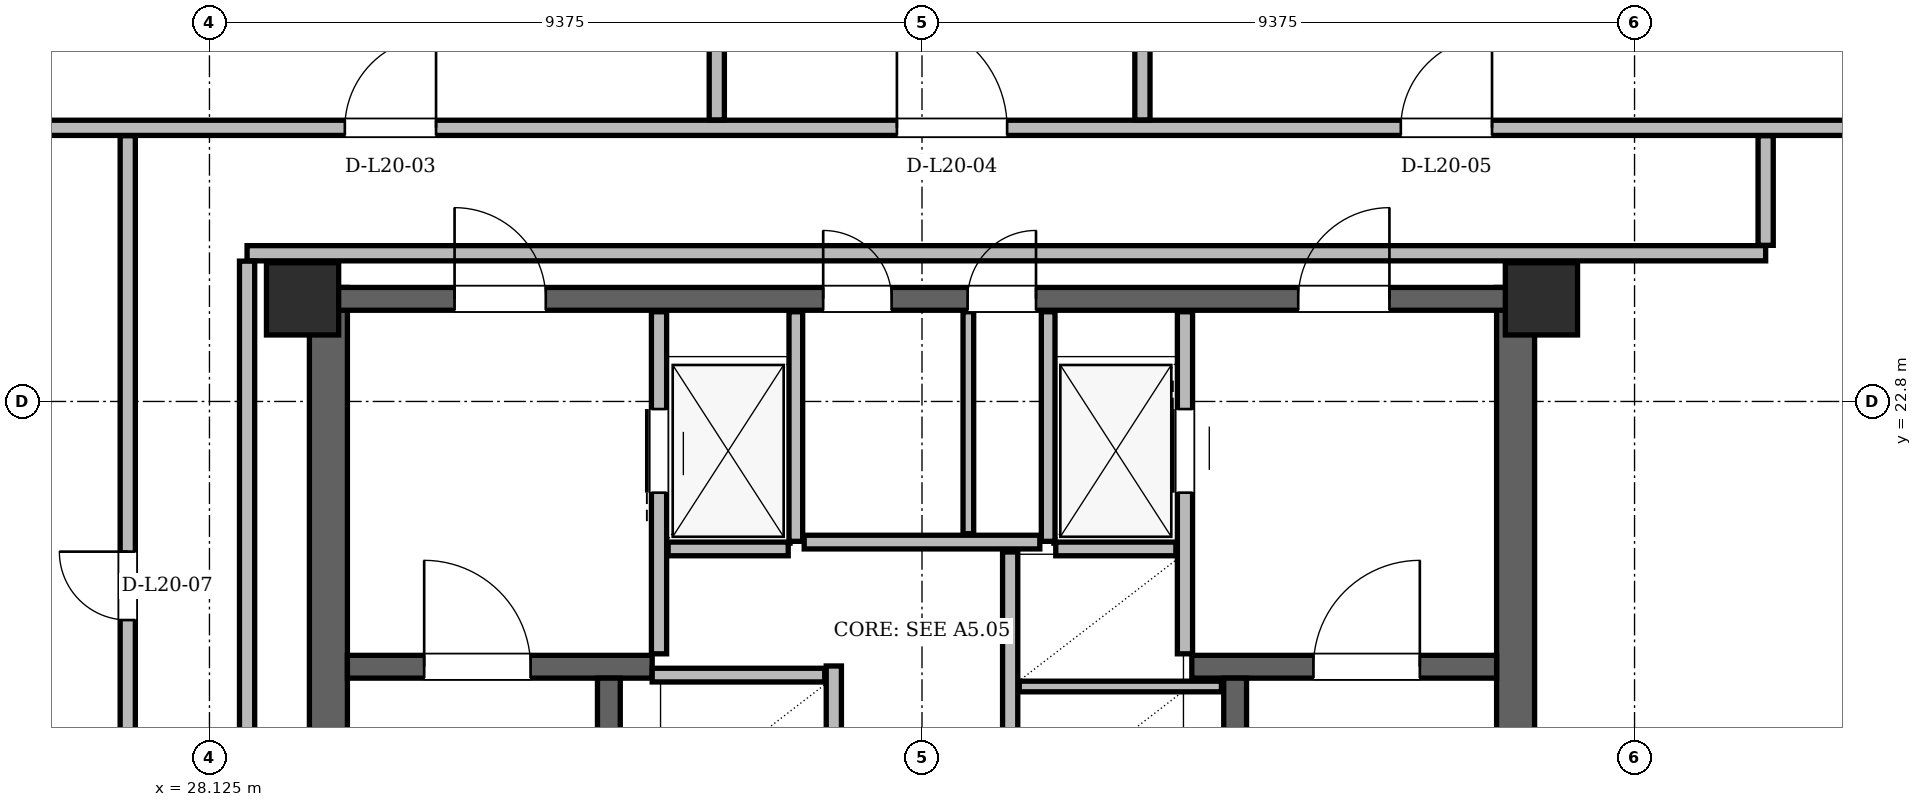
"""IFC4 building model, lengths in metres.
Left out: names, types, materials, properties, quantities, classifications, styles, units other than length and angle.
Written with IfcOpenShell. Run it as: python <this file> out.ifc"""

import sys

from ifc_helpers import new_model, si_unit, direction, frame, frame_2d, origin, origin_2d, place, context, subcontext, project, spatial, rectangle, hollow_rectangle, extrude, element, fill, save


model = new_model("IFC4")
c1 = context("Model", 3, precision=1e-05, world=origin(), true_north=direction((0.0, 1.0)))
c2 = subcontext(c1, "Body", "Model", "MODEL_VIEW")
j1 = project(units=[si_unit("LENGTHUNIT", "METRE"), si_unit("PLANEANGLEUNIT", "RADIAN")], contexts=[c1])
p1 = place(None, origin())
s1 = spatial("IfcSite", under=j1, at=p1, CompositionType="ELEMENT")
p2 = place(p1, origin())
s2 = spatial("IfcBuilding", under=s1, at=p2, CompositionType="ELEMENT")
p3 = place(p2, frame((0.0, 0.0, 77.7)))
s3 = spatial("IfcBuildingStorey", under=s2, at=p3, CompositionType="ELEMENT", Elevation=77.7)
for number, where, z_axis, x_axis in (
    (1, (45.65, 24.15, 0.0), (0.0, 0.0, 1.0), (1.0, 0.0, 0.0)),
    (2, (29.35, 24.15, 0.0), (0.0, 0.0, 1.0), (1.0, 0.0, 0.0)),
):
    element("IfcColumn", number, at=place(p3, frame(where, z_axis=z_axis, x_axis=x_axis)), inside=s3, PredefinedType="COLUMN", context=c2, shape_type="SweptSolid", body=[
        extrude(hollow_rectangle(XDim=0.95, YDim=0.95, WallThickness=0.08, at=origin_2d()), origin(), (0.0, 0.0, 1.0), 4.8),
    ])
for number, where, z_axis, x_axis in (
    (3, (29.69, 11.0, 0.0), (0.0, 0.0, 1.0), (0.0, 1.0, 0.0)),
    (4, (45.31, 11.0, 0.0), (0.0, 0.0, 1.0), (0.0, 1.0, 0.0)),
):
    element("IfcWall", number, at=place(p3, frame(where, z_axis=z_axis, x_axis=x_axis)), inside=s3, PredefinedType="SHEAR", context=c2, shape_type="SweptSolid", body=[
        extrude(rectangle(XDim=13.3, YDim=0.5, at=frame_2d((6.65, 0.0))), origin(), (0.0, 0.0, 1.0), 4.56),
    ])
p4 = place(p3, frame((29.65, 24.15, 0.0), z_axis=(0.0, 0.0, 1.0), x_axis=(1.0, 0.0, 0.0)))
e5 = element("IfcWall", 5, at=p4, inside=s3, PredefinedType="SHEAR", context=c2, shape_type="SweptSolid", body=[
    extrude(rectangle(XDim=15.7, YDim=0.3, at=frame_2d((7.85, 0.0))), origin(), (0.0, 0.0, 1.0), 4.56),
])
p5 = place(p4, frame((1.7, 0.0, 0.0)))
e6 = element("IfcOpeningElement", 6, at=p5, cuts=e5, PredefinedType="OPENING", context=c2, shape_type="SweptSolid", body=[
    extrude(rectangle(XDim=1.2, YDim=2.2, at=frame_2d((0.6, 1.1))), frame((0.0, 0.15, 0.0), z_axis=(0.0, -1.0, 0.0), x_axis=(1.0, 0.0, 0.0)), (0.0, 0.0, 1.0), 0.3),
])
p6 = place(p4, frame((12.8, 0.0, 0.0)))
e7 = element("IfcOpeningElement", 7, at=p6, cuts=e5, PredefinedType="OPENING", context=c2, shape_type="SweptSolid", body=[
    extrude(rectangle(XDim=1.2, YDim=2.2, at=frame_2d((0.6, 1.1))), frame((0.0, 0.15, 0.0), z_axis=(0.0, -1.0, 0.0), x_axis=(1.0, 0.0, 0.0)), (0.0, 0.0, 1.0), 0.3),
])
p7 = place(p4, frame((6.55, 0.0, 0.0)))
e8 = element("IfcOpeningElement", 8, at=p7, cuts=e5, PredefinedType="OPENING", context=c2, shape_type="SweptSolid", body=[
    extrude(rectangle(XDim=0.9, YDim=2.05, at=frame_2d((0.45, 1.025))), frame((0.0, 0.15, 0.0), z_axis=(0.0, -1.0, 0.0), x_axis=(1.0, 0.0, 0.0)), (0.0, 0.0, 1.0), 0.3),
])
p8 = place(p4, frame((8.45, 0.0, 0.0)))
e9 = element("IfcOpeningElement", 9, at=p8, cuts=e5, PredefinedType="OPENING", context=c2, shape_type="SweptSolid", body=[
    extrude(rectangle(XDim=0.9, YDim=2.05, at=frame_2d((0.45, 1.025))), frame((0.0, 0.15, 0.0), z_axis=(0.0, -1.0, 0.0), x_axis=(1.0, 0.0, 0.0)), (0.0, 0.0, 1.0), 0.3),
])
p9 = place(p3, frame((29.94, 19.31, 0.0), z_axis=(0.0, 0.0, 1.0), x_axis=(1.0, 0.0, 0.0)))
e10 = element("IfcWall", 10, at=p9, inside=s3, PredefinedType="SHEAR", context=c2, shape_type="SweptSolid", body=[
    extrude(rectangle(XDim=4.01, YDim=0.3, at=frame_2d((2.005, 0.0))), origin(), (0.0, 0.0, 1.0), 4.56),
])
p10 = place(p9, frame((1.01, 0.0, 0.0)))
e11 = element("IfcOpeningElement", 11, at=p10, cuts=e10, PredefinedType="OPENING", context=c2, shape_type="SweptSolid", body=[
    extrude(rectangle(XDim=1.4, YDim=2.2, at=frame_2d((0.7, 1.1))), frame((0.0, 0.15, 0.0), z_axis=(0.0, -1.0, 0.0), x_axis=(1.0, 0.0, 0.0)), (0.0, 0.0, 1.0), 0.3),
])
p11 = place(p3, frame((41.05, 19.31, 0.0), z_axis=(0.0, 0.0, 1.0), x_axis=(1.0, 0.0, 0.0)))
e12 = element("IfcWall", 12, at=p11, inside=s3, PredefinedType="SHEAR", context=c2, shape_type="SweptSolid", body=[
    extrude(rectangle(XDim=4.01, YDim=0.3, at=frame_2d((2.005, 0.0))), origin(), (0.0, 0.0, 1.0), 4.56),
])
p12 = place(p11, frame((1.6, 0.0, 0.0)))
e13 = element("IfcOpeningElement", 13, at=p12, cuts=e12, PredefinedType="OPENING", context=c2, shape_type="SweptSolid", body=[
    extrude(rectangle(XDim=1.4, YDim=2.2, at=frame_2d((0.7, 1.1))), frame((0.0, 0.15, 0.0), z_axis=(0.0, -1.0, 0.0), x_axis=(1.0, 0.0, 0.0)), (0.0, 0.0, 1.0), 0.3),
])
for number, where, z_axis, x_axis in (
    (14, (33.38, 11.54, 0.0), (0.0, 0.0, 1.0), (0.0, 1.0, 0.0)),
    (15, (41.62, 11.54, 0.0), (0.0, 0.0, 1.0), (0.0, 1.0, 0.0)),
):
    element("IfcWall", number, at=place(p3, frame(where, z_axis=z_axis, x_axis=x_axis)), inside=s3, PredefinedType="SHEAR", context=c2, shape_type="SweptSolid", body=[
        extrude(rectangle(XDim=7.62, YDim=0.3, at=frame_2d((3.81, 0.0))), origin(), (0.0, 0.0, 1.0), 4.56),
    ])
for number, where, z_axis, x_axis in (
    (16, (61.034, 14.044, 0.0), (0.0, 0.0, 1.0), (-0.5, 0.866, 0.0)),
    (17, (30.978, 43.509, 0.0), (0.0, 0.0, 1.0), (-0.5, -0.866, 0.0)),
):
    element("IfcWall", number, at=place(p3, frame(where, z_axis=z_axis, x_axis=x_axis)), inside=s3, PredefinedType="SOLIDWALL", context=c2, shape_type="SweptSolid", body=[
        extrude(rectangle(XDim=34.024, YDim=0.34, at=frame_2d((17.012, 0.0))), origin(), (0.0, 0.0, 1.0), 3.55),
    ])
p13 = place(p3, frame((34.04, 19.48, 0.0), z_axis=(0.0, 0.0, 1.0), x_axis=(0.0, 1.0, 0.0)))
e18 = element("IfcWall", 18, at=p13, inside=s3, PredefinedType="PARTITIONING", context=c2, shape_type="SweptSolid", body=[
    extrude(rectangle(XDim=4.5, YDim=0.2, at=frame_2d((2.25, 0.0))), origin(), (0.0, 0.0, 1.0), 3.6),
])
p14 = place(p13, frame((2.12, 0.0, 0.0)))
e19 = element("IfcOpeningElement", 19, at=p14, cuts=e18, PredefinedType="OPENING", context=c2, shape_type="SweptSolid", body=[
    extrude(rectangle(XDim=1.1, YDim=2.2, at=frame_2d((0.55, 1.1))), frame((0.0, 0.1, 0.0), z_axis=(0.0, -1.0, 0.0), x_axis=(1.0, 0.0, 0.0)), (0.0, 0.0, 1.0), 0.2),
])
p15 = place(p3, frame((35.84, 20.96, 0.0), z_axis=(0.0, 0.0, 1.0), x_axis=(0.0, 1.0, 0.0)))
e20 = element("IfcWall", 20, at=p15, inside=s3, PredefinedType="PARTITIONING", context=c2, shape_type="SweptSolid", body=[
    extrude(rectangle(XDim=3.02, YDim=0.18, at=frame_2d((1.51, 0.0))), origin(), (0.0, 0.0, 1.0), 3.6),
])
p16 = place(p3, frame((34.16, 20.86, 0.0), z_axis=(0.0, 0.0, 1.0), x_axis=(1.0, 0.0, 0.0)))
e21 = element("IfcWall", 21, at=p16, inside=s3, PredefinedType="PARTITIONING", context=c2, shape_type="SweptSolid", body=[
    extrude(rectangle(XDim=1.58, YDim=0.18, at=frame_2d((0.79, 0.0))), origin(), (0.0, 0.0, 1.0), 4.56),
])
p17 = place(p3, frame((40.96, 19.48, 0.0), z_axis=(0.0, 0.0, 1.0), x_axis=(0.0, 1.0, 0.0)))
e22 = element("IfcWall", 22, at=p17, inside=s3, PredefinedType="PARTITIONING", context=c2, shape_type="SweptSolid", body=[
    extrude(rectangle(XDim=4.5, YDim=0.2, at=frame_2d((2.25, 0.0))), origin(), (0.0, 0.0, 1.0), 3.6),
])
p18 = place(p17, frame((2.12, 0.0, 0.0)))
e23 = element("IfcOpeningElement", 23, at=p18, cuts=e22, PredefinedType="OPENING", context=c2, shape_type="SweptSolid", body=[
    extrude(rectangle(XDim=1.1, YDim=2.2, at=frame_2d((0.55, 1.1))), frame((0.0, 0.1, 0.0), z_axis=(0.0, -1.0, 0.0), x_axis=(1.0, 0.0, 0.0)), (0.0, 0.0, 1.0), 0.2),
])
p19 = place(p3, frame((39.16, 20.96, 0.0), z_axis=(0.0, 0.0, 1.0), x_axis=(0.0, 1.0, 0.0)))
e24 = element("IfcWall", 24, at=p19, inside=s3, PredefinedType="PARTITIONING", context=c2, shape_type="SweptSolid", body=[
    extrude(rectangle(XDim=3.02, YDim=0.18, at=frame_2d((1.51, 0.0))), origin(), (0.0, 0.0, 1.0), 3.6),
])
p20 = place(p3, frame((39.26, 20.86, 0.0), z_axis=(0.0, 0.0, 1.0), x_axis=(1.0, 0.0, 0.0)))
e25 = element("IfcWall", 25, at=p20, inside=s3, PredefinedType="PARTITIONING", context=c2, shape_type="SweptSolid", body=[
    extrude(rectangle(XDim=1.58, YDim=0.18, at=frame_2d((0.79, 0.0))), origin(), (0.0, 0.0, 1.0), 4.56),
])
p21 = place(p3, frame((36.34, 11.72, 0.0), z_axis=(0.0, 0.0, 1.0), x_axis=(0.0, 1.0, 0.0)))
e26 = element("IfcWall", 26, at=p21, inside=s3, PredefinedType="PARTITIONING", context=c2, shape_type="SweptSolid", body=[
    extrude(rectangle(XDim=7.6, YDim=0.2, at=frame_2d((3.8, 0.0))), origin(), (0.0, 0.0, 1.0), 4.56),
])
p22 = place(p21, frame((0.255, 0.0, 0.0)))
e27 = element("IfcOpeningElement", 27, at=p22, cuts=e26, PredefinedType="OPENING", context=c2, shape_type="SweptSolid", body=[
    extrude(rectangle(XDim=1.05, YDim=2.15, at=frame_2d((0.525, 1.075))), frame((0.0, 0.1, 0.0), z_axis=(0.0, -1.0, 0.0), x_axis=(1.0, 0.0, 0.0)), (0.0, 0.0, 1.0), 0.2),
])
p23 = place(p21, frame((2.105, 0.0, 0.0)))
e28 = element("IfcOpeningElement", 28, at=p23, cuts=e26, PredefinedType="OPENING", context=c2, shape_type="SweptSolid", body=[
    extrude(rectangle(XDim=1.05, YDim=2.15, at=frame_2d((0.525, 1.075))), frame((0.0, 0.1, 0.0), z_axis=(0.0, -1.0, 0.0), x_axis=(1.0, 0.0, 0.0)), (0.0, 0.0, 1.0), 0.2),
])
p24 = place(p21, frame((3.955, 0.0, 0.0)))
e29 = element("IfcOpeningElement", 29, at=p24, cuts=e26, PredefinedType="OPENING", context=c2, shape_type="SweptSolid", body=[
    extrude(rectangle(XDim=1.05, YDim=2.15, at=frame_2d((0.525, 1.075))), frame((0.0, 0.1, 0.0), z_axis=(0.0, -1.0, 0.0), x_axis=(1.0, 0.0, 0.0)), (0.0, 0.0, 1.0), 0.2),
])
p25 = place(p3, frame((33.95, 19.2, 0.0), z_axis=(0.0, 0.0, 1.0), x_axis=(1.0, 0.0, 0.0)))
e30 = element("IfcWall", 30, at=p25, inside=s3, PredefinedType="PARTITIONING", context=c2, shape_type="SweptSolid", body=[
    extrude(rectangle(XDim=2.27, YDim=0.18, at=frame_2d((1.135, 0.0))), origin(), (0.0, 0.0, 1.0), 4.56),
])
p26 = place(p3, frame((38.66, 11.72, 0.0), z_axis=(0.0, 0.0, 1.0), x_axis=(0.0, 1.0, 0.0)))
e31 = element("IfcWall", 31, at=p26, inside=s3, PredefinedType="PARTITIONING", context=c2, shape_type="SweptSolid", body=[
    extrude(rectangle(XDim=9.1, YDim=0.2, at=frame_2d((4.55, 0.0))), origin(), (0.0, 0.0, 1.0), 4.56),
])
p27 = place(p3, frame((38.78, 19.05, 0.0), z_axis=(0.0, 0.0, 1.0), x_axis=(1.0, 0.0, 0.0)))
e32 = element("IfcWall", 32, at=p27, inside=s3, PredefinedType="PARTITIONING", context=c2, shape_type="SweptSolid", body=[
    extrude(rectangle(XDim=2.66, YDim=0.14, at=frame_2d((1.33, 0.0))), origin(), (0.0, 0.0, 1.0), 4.56),
])
p28 = place(p3, frame((35.95, 20.95, 0.0), z_axis=(0.0, 0.0, 1.0), x_axis=(1.0, 0.0, 0.0)))
e33 = element("IfcWall", 33, at=p28, inside=s3, PredefinedType="PARTITIONING", context=c2, shape_type="SweptSolid", body=[
    extrude(rectangle(XDim=3.1, YDim=0.18, at=frame_2d((1.55, 0.0))), origin(), (0.0, 0.0, 1.0), 4.56),
])
p29 = place(p3, frame((38.11, 21.06, 0.0), z_axis=(0.0, 0.0, 1.0), x_axis=(0.0, 1.0, 0.0)))
e34 = element("IfcWall", 34, at=p29, inside=s3, PredefinedType="PARTITIONING", context=c2, shape_type="SweptSolid", body=[
    extrude(rectangle(XDim=2.92, YDim=0.14, at=frame_2d((1.46, 0.0))), origin(), (0.0, 0.0, 1.0), 3.6),
])
p30 = place(p3, frame((28.62, 24.75, 0.0), z_axis=(0.0, 0.0, 1.0), x_axis=(1.0, 0.0, 0.0)))
e35 = element("IfcWall", 35, at=p30, inside=s3, PredefinedType="PARTITIONING", context=c2, shape_type="SweptSolid", body=[
    extrude(rectangle(XDim=19.98, YDim=0.2, at=frame_2d((9.99, 0.0))), origin(), (0.0, 0.0, 1.0), 3.938),
])
p31 = place(p3, frame((21.301, 26.4, 0.0), z_axis=(0.0, 0.0, 1.0), x_axis=(1.0, 0.0, 0.0)))
e36 = element("IfcWall", 36, at=p31, inside=s3, PredefinedType="PARTITIONING", context=c2, shape_type="SweptSolid", body=[
    extrude(rectangle(XDim=32.398, YDim=0.2, at=frame_2d((16.199, 0.0))), origin(), (0.0, 0.0, 1.0), 3.55),
])
p32 = place(p31, frame((8.605, 0.0, 0.0)))
e37 = element("IfcOpeningElement", 37, at=p32, cuts=e36, PredefinedType="OPENING", context=c2, shape_type="SweptSolid", body=[
    extrude(rectangle(XDim=1.2, YDim=2.2, at=frame_2d((0.6, 1.1))), frame((0.0, 0.1, 0.0), z_axis=(0.0, -1.0, 0.0), x_axis=(1.0, 0.0, 0.0)), (0.0, 0.0, 1.0), 0.2),
])
p33 = place(p31, frame((15.869, 0.0, 0.0)))
e38 = element("IfcOpeningElement", 38, at=p33, cuts=e36, PredefinedType="OPENING", context=c2, shape_type="SweptSolid", body=[
    extrude(rectangle(XDim=1.45, YDim=2.25, at=frame_2d((0.725, 1.125))), frame((0.0, 0.1, 0.0), z_axis=(0.0, -1.0, 0.0), x_axis=(1.0, 0.0, 0.0)), (0.0, 0.0, 1.0), 0.2),
])
p34 = place(p31, frame((22.499, 0.0, 0.0)))
e39 = element("IfcOpeningElement", 39, at=p34, cuts=e36, PredefinedType="OPENING", context=c2, shape_type="SweptSolid", body=[
    extrude(rectangle(XDim=1.2, YDim=2.2, at=frame_2d((0.6, 1.1))), frame((0.0, 0.1, 0.0), z_axis=(0.0, -1.0, 0.0), x_axis=(1.0, 0.0, 0.0)), (0.0, 0.0, 1.0), 0.2),
])
p35 = place(p3, frame((27.05, 8.854, 0.0), z_axis=(0.0, 0.0, 1.0), x_axis=(0.0, 1.0, 0.0)))
e40 = element("IfcWall", 40, at=p35, inside=s3, PredefinedType="PARTITIONING", context=c2, shape_type="SweptSolid", body=[
    extrude(rectangle(XDim=17.442, YDim=0.2, at=frame_2d((8.721, 0.0))), origin(), (0.0, 0.0, 1.0), 3.938),
])
p36 = place(p35, frame((4.096, 0.0, 0.0)))
e41 = element("IfcOpeningElement", 41, at=p36, cuts=e40, PredefinedType="OPENING", context=c2, shape_type="SweptSolid", body=[
    extrude(rectangle(XDim=0.9, YDim=2.05, at=frame_2d((0.45, 1.025))), frame((0.0, 0.1, 0.0), z_axis=(0.0, -1.0, 0.0), x_axis=(1.0, 0.0, 0.0)), (0.0, 0.0, 1.0), 0.2),
])
p37 = place(p35, frame((11.07, 0.0, 0.0)))
e42 = element("IfcOpeningElement", 42, at=p37, cuts=e40, PredefinedType="OPENING", context=c2, shape_type="SweptSolid", body=[
    extrude(rectangle(XDim=0.9, YDim=2.05, at=frame_2d((0.45, 1.025))), frame((0.0, 0.1, 0.0), z_axis=(0.0, -1.0, 0.0), x_axis=(1.0, 0.0, 0.0)), (0.0, 0.0, 1.0), 0.2),
])
p38 = place(p3, frame((28.62, 10.504, 0.0), z_axis=(0.0, 0.0, 1.0), x_axis=(0.0, 1.0, 0.0)))
e43 = element("IfcWall", 43, at=p38, inside=s3, PredefinedType="PARTITIONING", context=c2, shape_type="SweptSolid", body=[
    extrude(rectangle(XDim=14.142, YDim=0.2, at=frame_2d((7.071, 0.0))), origin(), (0.0, 0.0, 1.0), 3.938),
])
for number, where, z_axis, x_axis in (
    (44, (34.8, 26.504, 0.0), (0.0, 0.0, 1.0), (0.0, 1.0, 0.0)),
    (45, (40.4, 26.504, 0.0), (0.0, 0.0, 1.0), (0.0, 1.0, 0.0)),
):
    element("IfcWall", number, at=place(p3, frame(where, z_axis=z_axis, x_axis=x_axis)), inside=s3, PredefinedType="PARTITIONING", context=c2, shape_type="SweptSolid", body=[
        extrude(rectangle(XDim=16.831, YDim=0.2, at=frame_2d((8.416, 0.0))), origin(), (0.0, 0.0, 1.0), 3.55),
    ])
p39 = place(p3, frame((48.6, 24.854, 0.0), z_axis=(0.0, 0.0, 1.0), x_axis=(0.0, 1.0, 0.0)))
e46 = element("IfcWall", 46, at=p39, inside=s3, PredefinedType="PARTITIONING", context=c2, shape_type="SweptSolid", body=[
    extrude(rectangle(XDim=1.442, YDim=0.2, at=frame_2d((0.721, 0.0))), origin(), (0.0, 0.0, 1.0), 4.56),
])
p40 = place(p14, origin())
e47 = element("IfcDoor", 47, at=p40, inside=s3, OperationType="SLIDING_TO_LEFT", PredefinedType="DOOR", context=c2, shape_type="SweptSolid", body=[
    extrude(rectangle(XDim=1.1, YDim=2.2, at=frame_2d((0.55, 1.1))), frame((0.0, 0.025, 0.0), z_axis=(0.0, -1.0, 0.0), x_axis=(1.0, 0.0, 0.0)), (0.0, 0.0, 1.0), 0.05),
])
fill(e19, e47)
p41 = place(p18, origin())
e48 = element("IfcDoor", 48, at=p41, inside=s3, OperationType="SLIDING_TO_RIGHT", PredefinedType="DOOR", context=c2, shape_type="SweptSolid", body=[
    extrude(rectangle(XDim=1.1, YDim=2.2, at=frame_2d((0.55, 1.1))), frame((0.0, 0.025, 0.0), z_axis=(0.0, -1.0, 0.0), x_axis=(1.0, 0.0, 0.0)), (0.0, 0.0, 1.0), 0.05),
])
fill(e23, e48)
p42 = place(p10, origin())
e49 = element("IfcDoor", 49, at=p42, inside=s3, OperationType="SINGLE_SWING_LEFT", PredefinedType="DOOR", context=c2, shape_type="SweptSolid", body=[
    extrude(rectangle(XDim=1.4, YDim=2.2, at=frame_2d((0.7, 1.1))), frame((0.0, 0.025, 0.0), z_axis=(0.0, -1.0, 0.0), x_axis=(1.0, 0.0, 0.0)), (0.0, 0.0, 1.0), 0.05),
])
fill(e11, e49)
p43 = place(p12, origin())
e50 = element("IfcDoor", 50, at=p43, inside=s3, OperationType="SINGLE_SWING_RIGHT", PredefinedType="DOOR", context=c2, shape_type="SweptSolid", body=[
    extrude(rectangle(XDim=1.4, YDim=2.2, at=frame_2d((0.7, 1.1))), frame((0.0, 0.025, 0.0), z_axis=(0.0, -1.0, 0.0), x_axis=(1.0, 0.0, 0.0)), (0.0, 0.0, 1.0), 0.05),
])
fill(e13, e50)
p44 = place(p5, origin())
e51 = element("IfcDoor", 51, at=p44, inside=s3, OperationType="SINGLE_SWING_LEFT", PredefinedType="DOOR", context=c2, shape_type="SweptSolid", body=[
    extrude(rectangle(XDim=1.2, YDim=2.2, at=frame_2d((0.6, 1.1))), frame((0.0, 0.025, 0.0), z_axis=(0.0, -1.0, 0.0), x_axis=(1.0, 0.0, 0.0)), (0.0, 0.0, 1.0), 0.05),
])
fill(e6, e51)
p45 = place(p6, origin())
e52 = element("IfcDoor", 52, at=p45, inside=s3, OperationType="SINGLE_SWING_RIGHT", PredefinedType="DOOR", context=c2, shape_type="SweptSolid", body=[
    extrude(rectangle(XDim=1.2, YDim=2.2, at=frame_2d((0.6, 1.1))), frame((0.0, 0.025, 0.0), z_axis=(0.0, -1.0, 0.0), x_axis=(1.0, 0.0, 0.0)), (0.0, 0.0, 1.0), 0.05),
])
fill(e7, e52)
p46 = place(p7, origin())
e53 = element("IfcDoor", 53, at=p46, inside=s3, OperationType="SINGLE_SWING_LEFT", PredefinedType="DOOR", context=c2, shape_type="SweptSolid", body=[
    extrude(rectangle(XDim=0.9, YDim=2.05, at=frame_2d((0.45, 1.025))), frame((0.0, 0.025, 0.0), z_axis=(0.0, -1.0, 0.0), x_axis=(1.0, 0.0, 0.0)), (0.0, 0.0, 1.0), 0.05),
])
fill(e8, e53)
p47 = place(p8, origin())
e54 = element("IfcDoor", 54, at=p47, inside=s3, OperationType="SINGLE_SWING_RIGHT", PredefinedType="DOOR", context=c2, shape_type="SweptSolid", body=[
    extrude(rectangle(XDim=0.9, YDim=2.05, at=frame_2d((0.45, 1.025))), frame((0.0, 0.025, 0.0), z_axis=(0.0, -1.0, 0.0), x_axis=(1.0, 0.0, 0.0)), (0.0, 0.0, 1.0), 0.05),
])
fill(e9, e54)
p48 = place(p32, origin())
e55 = element("IfcDoor", 55, at=p48, inside=s3, OperationType="SINGLE_SWING_RIGHT", PredefinedType="DOOR", context=c2, shape_type="SweptSolid", body=[
    extrude(rectangle(XDim=1.2, YDim=2.2, at=frame_2d((0.6, 1.1))), frame((0.0, 0.025, 0.0), z_axis=(0.0, -1.0, 0.0), x_axis=(1.0, 0.0, 0.0)), (0.0, 0.0, 1.0), 0.05),
])
fill(e37, e55)
p49 = place(p33, origin())
e56 = element("IfcDoor", 56, at=p49, inside=s3, OperationType="SINGLE_SWING_LEFT", PredefinedType="DOOR", context=c2, shape_type="SweptSolid", body=[
    extrude(rectangle(XDim=1.45, YDim=2.25, at=frame_2d((0.725, 1.125))), frame((0.0, 0.025, 0.0), z_axis=(0.0, -1.0, 0.0), x_axis=(1.0, 0.0, 0.0)), (0.0, 0.0, 1.0), 0.05),
])
fill(e38, e56)
p50 = place(p34, origin())
e57 = element("IfcDoor", 57, at=p50, inside=s3, OperationType="SINGLE_SWING_RIGHT", PredefinedType="DOOR", context=c2, shape_type="SweptSolid", body=[
    extrude(rectangle(XDim=1.2, YDim=2.2, at=frame_2d((0.6, 1.1))), frame((0.0, 0.025, 0.0), z_axis=(0.0, -1.0, 0.0), x_axis=(1.0, 0.0, 0.0)), (0.0, 0.0, 1.0), 0.05),
])
fill(e39, e57)
p51 = place(p37, origin())
e58 = element("IfcDoor", 58, at=p51, inside=s3, OperationType="SINGLE_SWING_RIGHT", PredefinedType="DOOR", context=c2, shape_type="SweptSolid", body=[
    extrude(rectangle(XDim=0.9, YDim=2.05, at=frame_2d((0.45, 1.025))), frame((0.0, 0.025, 0.0), z_axis=(0.0, -1.0, 0.0), x_axis=(1.0, 0.0, 0.0)), (0.0, 0.0, 1.0), 0.05),
])
fill(e42, e58)
save(model, sys.argv[1])
